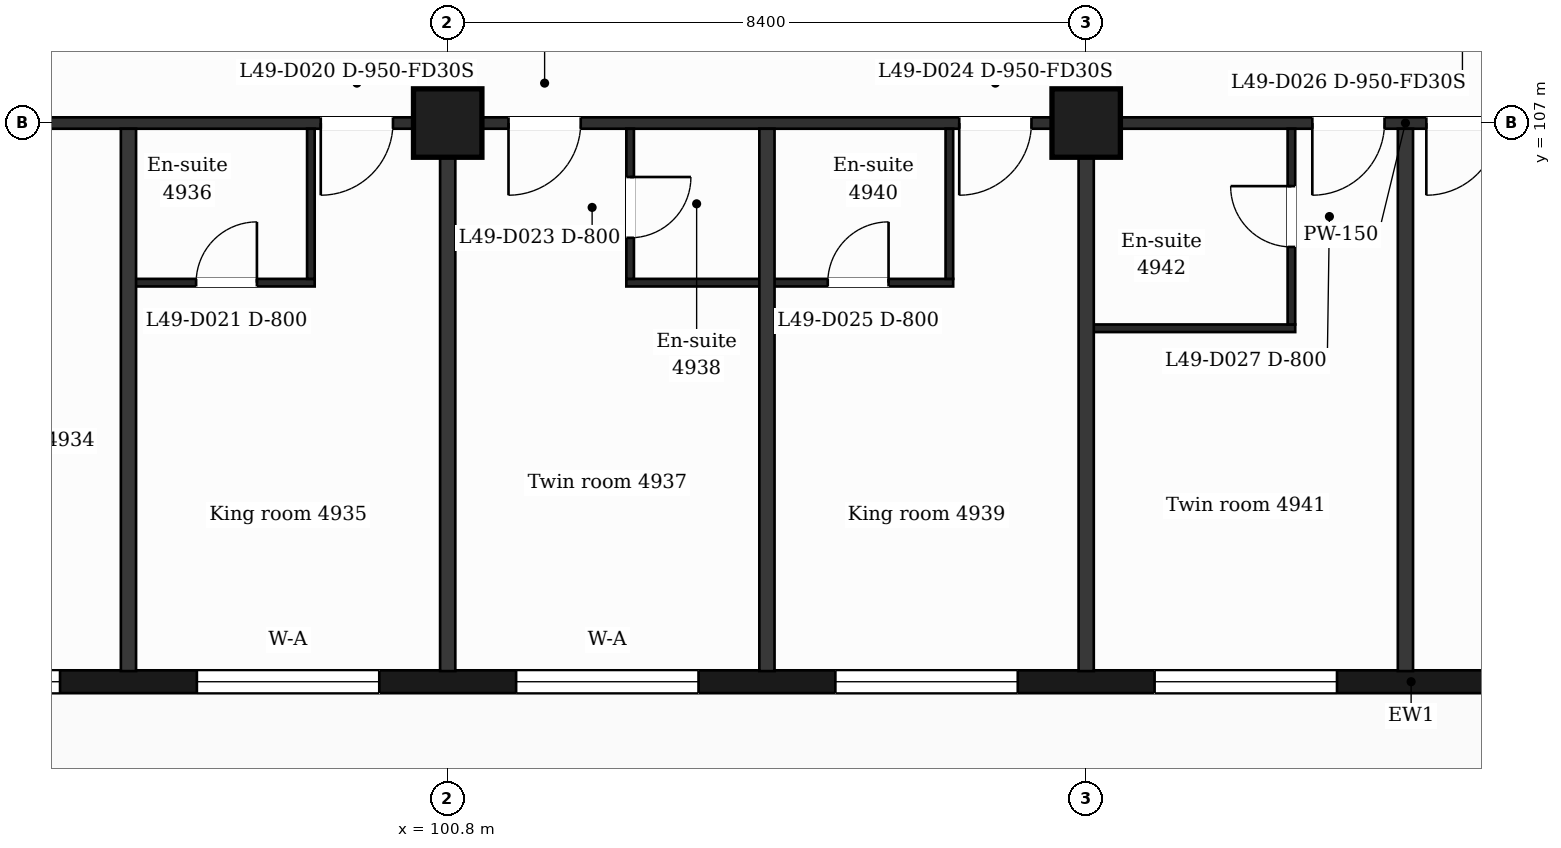
"""IFC4 building model, lengths in metres.
Left out: names, types, materials, properties, quantities, classifications, styles, units other than length and angle.
Written with IfcOpenShell. Run it as: python <this file> out.ifc"""

import sys

from ifc_helpers import new_model, si_unit, direction, frame, frame_2d, origin, origin_2d, place, context, subcontext, project, spatial, rectangle, extrude, element, fill, save


model = new_model("IFC4")
c1 = context("Model", 3, precision=1e-05, world=origin(), true_north=direction((0.0, 1.0)))
c2 = subcontext(c1, "Body", "Model", "MODEL_VIEW")
j1 = project(units=[si_unit("LENGTHUNIT", "METRE"), si_unit("PLANEANGLEUNIT", "RADIAN")], contexts=[c1])
p1 = place(None, origin())
s1 = spatial("IfcSite", under=j1, at=p1, CompositionType="ELEMENT")
p2 = place(p1, origin())
s2 = spatial("IfcBuilding", under=s1, at=p2, CompositionType="ELEMENT")
p3 = place(p2, frame((0.0, 0.0, 205.9)))
s3 = spatial("IfcBuildingStorey", under=s2, at=p3, CompositionType="ELEMENT", Elevation=205.9)
for number, where, z_axis, x_axis in (
    (1, (100.8, 107.0, 0.0), (0.0, 0.0, 1.0), (1.0, 0.0, 0.0)),
    (2, (109.2, 107.0, 0.0), (0.0, 0.0, 1.0), (1.0, 0.0, 0.0)),
):
    element("IfcColumn", number, at=place(p3, frame(where, z_axis=z_axis, x_axis=x_axis)), inside=s3, PredefinedType="COLUMN", context=c2, shape_type="SweptSolid", body=[
        extrude(rectangle(XDim=0.9, YDim=0.9, at=origin_2d()), origin(), (0.0, 0.0, 1.0), 3.7),
    ])
p4 = place(p3, frame((89.85, 99.65, 0.0), z_axis=(0.0, 0.0, 1.0), x_axis=(1.0, 0.0, 0.0)))
e3 = element("IfcWall", 3, at=p4, inside=s3, PredefinedType="SOLIDWALL", context=c2, shape_type="SweptSolid", body=[
    extrude(rectangle(XDim=47.25, YDim=0.3, at=frame_2d((23.625, 0.0))), origin(), (0.0, 0.0, 1.0), 3.38),
])
p5 = place(p4, frame((0.725, 0.0, 0.9)))
e4 = element("IfcOpeningElement", 4, at=p5, cuts=e3, PredefinedType="OPENING", context=c2, shape_type="SweptSolid", body=[
    extrude(rectangle(XDim=1.2, YDim=2.1, at=frame_2d((0.6, 1.05))), frame((0.0, 0.16, 0.0), z_axis=(0.0, -1.0, 0.0), x_axis=(1.0, 0.0, 0.0)), (0.0, 0.0, 1.0), 0.32),
])
p6 = place(p4, frame((3.45, 0.0, 0.9)))
e5 = element("IfcOpeningElement", 5, at=p6, cuts=e3, PredefinedType="OPENING", context=c2, shape_type="SweptSolid", body=[
    extrude(rectangle(XDim=2.4, YDim=2.1, at=frame_2d((1.2, 1.05))), frame((0.0, 0.16, 0.0), z_axis=(0.0, -1.0, 0.0), x_axis=(1.0, 0.0, 0.0)), (0.0, 0.0, 1.0), 0.32),
])
p7 = place(p4, frame((7.65, 0.0, 0.9)))
e6 = element("IfcOpeningElement", 6, at=p7, cuts=e3, PredefinedType="OPENING", context=c2, shape_type="SweptSolid", body=[
    extrude(rectangle(XDim=2.4, YDim=2.1, at=frame_2d((1.2, 1.05))), frame((0.0, 0.16, 0.0), z_axis=(0.0, -1.0, 0.0), x_axis=(1.0, 0.0, 0.0)), (0.0, 0.0, 1.0), 0.32),
])
p8 = place(p4, frame((11.85, 0.0, 0.9)))
e7 = element("IfcOpeningElement", 7, at=p8, cuts=e3, PredefinedType="OPENING", context=c2, shape_type="SweptSolid", body=[
    extrude(rectangle(XDim=2.4, YDim=2.1, at=frame_2d((1.2, 1.05))), frame((0.0, 0.16, 0.0), z_axis=(0.0, -1.0, 0.0), x_axis=(1.0, 0.0, 0.0)), (0.0, 0.0, 1.0), 0.32),
])
p9 = place(p4, frame((16.05, 0.0, 0.9)))
e8 = element("IfcOpeningElement", 8, at=p9, cuts=e3, PredefinedType="OPENING", context=c2, shape_type="SweptSolid", body=[
    extrude(rectangle(XDim=2.4, YDim=2.1, at=frame_2d((1.2, 1.05))), frame((0.0, 0.16, 0.0), z_axis=(0.0, -1.0, 0.0), x_axis=(1.0, 0.0, 0.0)), (0.0, 0.0, 1.0), 0.32),
])
p10 = place(p4, frame((20.25, 0.0, 0.9)))
e9 = element("IfcOpeningElement", 9, at=p10, cuts=e3, PredefinedType="OPENING", context=c2, shape_type="SweptSolid", body=[
    extrude(rectangle(XDim=2.4, YDim=2.1, at=frame_2d((1.2, 1.05))), frame((0.0, 0.16, 0.0), z_axis=(0.0, -1.0, 0.0), x_axis=(1.0, 0.0, 0.0)), (0.0, 0.0, 1.0), 0.32),
])
p11 = place(p4, frame((25.05, 0.0, 0.9)))
e10 = element("IfcOpeningElement", 10, at=p11, cuts=e3, PredefinedType="OPENING", context=c2, shape_type="SweptSolid", body=[
    extrude(rectangle(XDim=1.2, YDim=2.1, at=frame_2d((0.6, 1.05))), frame((0.0, 0.16, 0.0), z_axis=(0.0, -1.0, 0.0), x_axis=(1.0, 0.0, 0.0)), (0.0, 0.0, 1.0), 0.32),
])
p12 = place(p4, frame((29.25, 0.0, 0.9)))
e11 = element("IfcOpeningElement", 11, at=p12, cuts=e3, PredefinedType="OPENING", context=c2, shape_type="SweptSolid", body=[
    extrude(rectangle(XDim=1.2, YDim=2.1, at=frame_2d((0.6, 1.05))), frame((0.0, 0.16, 0.0), z_axis=(0.0, -1.0, 0.0), x_axis=(1.0, 0.0, 0.0)), (0.0, 0.0, 1.0), 0.32),
])
p13 = place(p4, frame((32.55, 0.0, 0.0)))
e12 = element("IfcOpeningElement", 12, at=p13, cuts=e3, PredefinedType="OPENING", context=c2, shape_type="SweptSolid", body=[
    extrude(rectangle(XDim=1.2, YDim=2.4, at=frame_2d((0.6, 1.2))), frame((0.0, 0.16, 0.0), z_axis=(0.0, -1.0, 0.0), x_axis=(1.0, 0.0, 0.0)), (0.0, 0.0, 1.0), 0.32),
])
p14 = place(p4, frame((34.35, 0.0, 0.9)))
e13 = element("IfcOpeningElement", 13, at=p14, cuts=e3, PredefinedType="OPENING", context=c2, shape_type="SweptSolid", body=[
    extrude(rectangle(XDim=1.2, YDim=2.1, at=frame_2d((0.6, 1.05))), frame((0.0, 0.16, 0.0), z_axis=(0.0, -1.0, 0.0), x_axis=(1.0, 0.0, 0.0)), (0.0, 0.0, 1.0), 0.32),
])
p15 = place(p4, frame((37.05, 0.0, 0.9)))
e14 = element("IfcOpeningElement", 14, at=p15, cuts=e3, PredefinedType="OPENING", context=c2, shape_type="SweptSolid", body=[
    extrude(rectangle(XDim=2.4, YDim=2.1, at=frame_2d((1.2, 1.05))), frame((0.0, 0.16, 0.0), z_axis=(0.0, -1.0, 0.0), x_axis=(1.0, 0.0, 0.0)), (0.0, 0.0, 1.0), 0.32),
])
p16 = place(p4, frame((40.95, 0.0, 0.0)))
e15 = element("IfcOpeningElement", 15, at=p16, cuts=e3, PredefinedType="OPENING", context=c2, shape_type="SweptSolid", body=[
    extrude(rectangle(XDim=1.2, YDim=2.4, at=frame_2d((0.6, 1.2))), frame((0.0, 0.16, 0.0), z_axis=(0.0, -1.0, 0.0), x_axis=(1.0, 0.0, 0.0)), (0.0, 0.0, 1.0), 0.32),
])
p17 = place(p4, frame((42.75, 0.0, 0.9)))
e16 = element("IfcOpeningElement", 16, at=p17, cuts=e3, PredefinedType="OPENING", context=c2, shape_type="SweptSolid", body=[
    extrude(rectangle(XDim=1.2, YDim=2.1, at=frame_2d((0.6, 1.05))), frame((0.0, 0.16, 0.0), z_axis=(0.0, -1.0, 0.0), x_axis=(1.0, 0.0, 0.0)), (0.0, 0.0, 1.0), 0.32),
])
p18 = place(p4, frame((45.25, 0.0, 0.9)))
e17 = element("IfcOpeningElement", 17, at=p18, cuts=e3, PredefinedType="OPENING", context=c2, shape_type="SweptSolid", body=[
    extrude(rectangle(XDim=1.2, YDim=2.1, at=frame_2d((0.6, 1.05))), frame((0.0, 0.16, 0.0), z_axis=(0.0, -1.0, 0.0), x_axis=(1.0, 0.0, 0.0)), (0.0, 0.0, 1.0), 0.32),
])
p19 = place(p3, frame((109.2, 104.3, 0.0), z_axis=(0.0, 0.0, 1.0), x_axis=(1.0, 0.0, 0.0)))
e18 = element("IfcWall", 18, at=p19, inside=s3, PredefinedType="PARTITIONING", context=c2, shape_type="SweptSolid", body=[
    extrude(rectangle(XDim=2.75, YDim=0.1, at=frame_2d((1.375, 0.0))), origin(), (0.0, 0.0, 1.0), 3.38),
])
p20 = place(p3, frame((96.6, 104.9, 0.0), z_axis=(0.0, 0.0, 1.0), x_axis=(1.0, 0.0, 0.0)))
e19 = element("IfcWall", 19, at=p20, inside=s3, PredefinedType="PARTITIONING", context=c2, shape_type="SweptSolid", body=[
    extrude(rectangle(XDim=2.45, YDim=0.1, at=frame_2d((1.225, 0.0))), origin(), (0.0, 0.0, 1.0), 3.38),
])
p21 = place(p20, frame((0.89, 0.0, 0.0)))
e20 = element("IfcOpeningElement", 20, at=p21, cuts=e19, PredefinedType="OPENING", context=c2, shape_type="SweptSolid", body=[
    extrude(rectangle(XDim=0.8, YDim=2.1, at=frame_2d((0.4, 1.05))), frame((0.0, 0.06, 0.0), z_axis=(0.0, -1.0, 0.0), x_axis=(1.0, 0.0, 0.0)), (0.0, 0.0, 1.0), 0.12),
])
p22 = place(p3, frame((103.15, 104.9, 0.0), z_axis=(0.0, 0.0, 1.0), x_axis=(1.0, 0.0, 0.0)))
e21 = element("IfcWall", 21, at=p22, inside=s3, PredefinedType="PARTITIONING", context=c2, shape_type="SweptSolid", body=[
    extrude(rectangle(XDim=4.3, YDim=0.1, at=frame_2d((2.15, 0.0))), origin(), (0.0, 0.0, 1.0), 3.38),
])
p23 = place(p22, frame((2.65, 0.0, 0.0)))
e22 = element("IfcOpeningElement", 22, at=p23, cuts=e21, PredefinedType="OPENING", context=c2, shape_type="SweptSolid", body=[
    extrude(rectangle(XDim=0.8, YDim=2.1, at=frame_2d((0.4, 1.05))), frame((0.0, 0.06, 0.0), z_axis=(0.0, -1.0, 0.0), x_axis=(1.0, 0.0, 0.0)), (0.0, 0.0, 1.0), 0.12),
])
p24 = place(p3, frame((87.018, 107.0, 0.0), z_axis=(0.0, 0.0, 1.0), x_axis=(1.0, 0.0, 0.0)))
e23 = element("IfcWall", 23, at=p24, inside=s3, PredefinedType="PARTITIONING", context=c2, shape_type="SweptSolid", body=[
    extrude(rectangle(XDim=52.765, YDim=0.15, at=frame_2d((26.382, 0.0))), origin(), (0.0, 0.0, 1.0), 3.38),
])
p25 = place(p24, frame((1.276, 0.0, 0.0)))
e24 = element("IfcOpeningElement", 24, at=p25, cuts=e23, PredefinedType="OPENING", context=c2, shape_type="SweptSolid", body=[
    extrude(rectangle(XDim=0.95, YDim=2.1, at=frame_2d((0.475, 1.05))), frame((0.0, 0.085, 0.0), z_axis=(0.0, -1.0, 0.0), x_axis=(1.0, 0.0, 0.0)), (0.0, 0.0, 1.0), 0.17),
])
p26 = place(p24, frame((6.369, 0.0, 0.0)))
e25 = element("IfcOpeningElement", 25, at=p26, cuts=e23, PredefinedType="OPENING", context=c2, shape_type="SweptSolid", body=[
    extrude(rectangle(XDim=0.95, YDim=2.1, at=frame_2d((0.475, 1.05))), frame((0.0, 0.085, 0.0), z_axis=(0.0, -1.0, 0.0), x_axis=(1.0, 0.0, 0.0)), (0.0, 0.0, 1.0), 0.17),
])
p27 = place(p24, frame((12.112, 0.0, 0.0)))
e26 = element("IfcOpeningElement", 26, at=p27, cuts=e23, PredefinedType="OPENING", context=c2, shape_type="SweptSolid", body=[
    extrude(rectangle(XDim=0.95, YDim=2.1, at=frame_2d((0.475, 1.05))), frame((0.0, 0.085, 0.0), z_axis=(0.0, -1.0, 0.0), x_axis=(1.0, 0.0, 0.0)), (0.0, 0.0, 1.0), 0.17),
])
p28 = place(p24, frame((14.582, 0.0, 0.0)))
e27 = element("IfcOpeningElement", 27, at=p28, cuts=e23, PredefinedType="OPENING", context=c2, shape_type="SweptSolid", body=[
    extrude(rectangle(XDim=0.95, YDim=2.1, at=frame_2d((0.475, 1.05))), frame((0.0, 0.085, 0.0), z_axis=(0.0, -1.0, 0.0), x_axis=(1.0, 0.0, 0.0)), (0.0, 0.0, 1.0), 0.17),
])
p29 = place(p24, frame((20.512, 0.0, 0.0)))
e28 = element("IfcOpeningElement", 28, at=p29, cuts=e23, PredefinedType="OPENING", context=c2, shape_type="SweptSolid", body=[
    extrude(rectangle(XDim=0.95, YDim=2.1, at=frame_2d((0.475, 1.05))), frame((0.0, 0.085, 0.0), z_axis=(0.0, -1.0, 0.0), x_axis=(1.0, 0.0, 0.0)), (0.0, 0.0, 1.0), 0.17),
])
p30 = place(p24, frame((25.157, 0.0, 0.0)))
e29 = element("IfcOpeningElement", 29, at=p30, cuts=e23, PredefinedType="OPENING", context=c2, shape_type="SweptSolid", body=[
    extrude(rectangle(XDim=0.95, YDim=2.1, at=frame_2d((0.475, 1.05))), frame((0.0, 0.085, 0.0), z_axis=(0.0, -1.0, 0.0), x_axis=(1.0, 0.0, 0.0)), (0.0, 0.0, 1.0), 0.17),
])
p31 = place(p24, frame((26.657, 0.0, 0.0)))
e30 = element("IfcOpeningElement", 30, at=p31, cuts=e23, PredefinedType="OPENING", context=c2, shape_type="SweptSolid", body=[
    extrude(rectangle(XDim=0.95, YDim=2.1, at=frame_2d((0.475, 1.05))), frame((0.0, 0.085, 0.0), z_axis=(0.0, -1.0, 0.0), x_axis=(1.0, 0.0, 0.0)), (0.0, 0.0, 1.0), 0.17),
])
p32 = place(p24, frame((31.302, 0.0, 0.0)))
e31 = element("IfcOpeningElement", 31, at=p32, cuts=e23, PredefinedType="OPENING", context=c2, shape_type="SweptSolid", body=[
    extrude(rectangle(XDim=0.95, YDim=2.1, at=frame_2d((0.475, 1.05))), frame((0.0, 0.085, 0.0), z_axis=(0.0, -1.0, 0.0), x_axis=(1.0, 0.0, 0.0)), (0.0, 0.0, 1.0), 0.17),
])
p33 = place(p24, frame((41.207, 0.0, 0.0)))
e32 = element("IfcOpeningElement", 32, at=p33, cuts=e23, PredefinedType="OPENING", context=c2, shape_type="SweptSolid", body=[
    extrude(rectangle(XDim=1.0, YDim=2.1, at=frame_2d((0.5, 1.05))), frame((0.0, 0.085, 0.0), z_axis=(0.0, -1.0, 0.0), x_axis=(1.0, 0.0, 0.0)), (0.0, 0.0, 1.0), 0.17),
])
p34 = place(p24, frame((43.907, 0.0, 0.0)))
e33 = element("IfcOpeningElement", 33, at=p34, cuts=e23, PredefinedType="OPENING", context=c2, shape_type="SweptSolid", body=[
    extrude(rectangle(XDim=0.95, YDim=2.1, at=frame_2d((0.475, 1.05))), frame((0.0, 0.085, 0.0), z_axis=(0.0, -1.0, 0.0), x_axis=(1.0, 0.0, 0.0)), (0.0, 0.0, 1.0), 0.17),
])
p35 = place(p24, frame((49.285, 0.0, 0.0)))
e34 = element("IfcOpeningElement", 34, at=p35, cuts=e23, PredefinedType="OPENING", context=c2, shape_type="SweptSolid", body=[
    extrude(rectangle(XDim=0.95, YDim=2.1, at=frame_2d((0.475, 1.05))), frame((0.0, 0.085, 0.0), z_axis=(0.0, -1.0, 0.0), x_axis=(1.0, 0.0, 0.0)), (0.0, 0.0, 1.0), 0.17),
])
p36 = place(p3, frame((96.6, 99.79, 0.0), z_axis=(0.0, 0.0, 1.0), x_axis=(0.0, 1.0, 0.0)))
e35 = element("IfcWall", 35, at=p36, inside=s3, PredefinedType="PARTITIONING", context=c2, shape_type="SweptSolid", body=[
    extrude(rectangle(XDim=7.135, YDim=0.2, at=frame_2d((3.567, 0.0))), origin(), (0.0, 0.0, 1.0), 3.38),
])
p37 = place(p3, frame((99.0, 104.95, 0.0), z_axis=(0.0, 0.0, 1.0), x_axis=(0.0, 1.0, 0.0)))
e36 = element("IfcWall", 36, at=p37, inside=s3, PredefinedType="PARTITIONING", context=c2, shape_type="SweptSolid", body=[
    extrude(rectangle(XDim=1.975, YDim=0.1, at=frame_2d((0.988, 0.0))), origin(), (0.0, 0.0, 1.0), 3.38),
])
p38 = place(p3, frame((100.8, 99.79, 0.0), z_axis=(0.0, 0.0, 1.0), x_axis=(0.0, 1.0, 0.0)))
e37 = element("IfcWall", 37, at=p38, inside=s3, PredefinedType="PARTITIONING", context=c2, shape_type="SweptSolid", body=[
    extrude(rectangle(XDim=7.135, YDim=0.2, at=frame_2d((3.567, 0.0))), origin(), (0.0, 0.0, 1.0), 3.38),
])
p39 = place(p3, frame((103.2, 104.95, 0.0), z_axis=(0.0, 0.0, 1.0), x_axis=(0.0, 1.0, 0.0)))
e38 = element("IfcWall", 38, at=p39, inside=s3, PredefinedType="PARTITIONING", context=c2, shape_type="SweptSolid", body=[
    extrude(rectangle(XDim=1.975, YDim=0.1, at=frame_2d((0.988, 0.0))), origin(), (0.0, 0.0, 1.0), 3.38),
])
p40 = place(p39, frame((0.54, 0.0, 0.0)))
e39 = element("IfcOpeningElement", 39, at=p40, cuts=e38, PredefinedType="OPENING", context=c2, shape_type="SweptSolid", body=[
    extrude(rectangle(XDim=0.8, YDim=2.1, at=frame_2d((0.4, 1.05))), frame((0.0, 0.06, 0.0), z_axis=(0.0, -1.0, 0.0), x_axis=(1.0, 0.0, 0.0)), (0.0, 0.0, 1.0), 0.12),
])
p41 = place(p3, frame((105.0, 99.79, 0.0), z_axis=(0.0, 0.0, 1.0), x_axis=(0.0, 1.0, 0.0)))
e40 = element("IfcWall", 40, at=p41, inside=s3, PredefinedType="PARTITIONING", context=c2, shape_type="SweptSolid", body=[
    extrude(rectangle(XDim=7.135, YDim=0.2, at=frame_2d((3.567, 0.0))), origin(), (0.0, 0.0, 1.0), 3.38),
])
p42 = place(p3, frame((107.4, 104.95, 0.0), z_axis=(0.0, 0.0, 1.0), x_axis=(0.0, 1.0, 0.0)))
e41 = element("IfcWall", 41, at=p42, inside=s3, PredefinedType="PARTITIONING", context=c2, shape_type="SweptSolid", body=[
    extrude(rectangle(XDim=1.975, YDim=0.1, at=frame_2d((0.988, 0.0))), origin(), (0.0, 0.0, 1.0), 3.38),
])
p43 = place(p3, frame((109.2, 99.79, 0.0), z_axis=(0.0, 0.0, 1.0), x_axis=(0.0, 1.0, 0.0)))
e42 = element("IfcWall", 42, at=p43, inside=s3, PredefinedType="PARTITIONING", context=c2, shape_type="SweptSolid", body=[
    extrude(rectangle(XDim=7.135, YDim=0.2, at=frame_2d((3.567, 0.0))), origin(), (0.0, 0.0, 1.0), 3.38),
])
p44 = place(p3, frame((111.9, 104.35, 0.0), z_axis=(0.0, 0.0, 1.0), x_axis=(0.0, 1.0, 0.0)))
e43 = element("IfcWall", 43, at=p44, inside=s3, PredefinedType="PARTITIONING", context=c2, shape_type="SweptSolid", body=[
    extrude(rectangle(XDim=2.575, YDim=0.1, at=frame_2d((1.288, 0.0))), origin(), (0.0, 0.0, 1.0), 3.38),
])
p45 = place(p44, frame((1.02, 0.0, 0.0)))
e44 = element("IfcOpeningElement", 44, at=p45, cuts=e43, PredefinedType="OPENING", context=c2, shape_type="SweptSolid", body=[
    extrude(rectangle(XDim=0.8, YDim=2.1, at=frame_2d((0.4, 1.05))), frame((0.0, 0.06, 0.0), z_axis=(0.0, -1.0, 0.0), x_axis=(1.0, 0.0, 0.0)), (0.0, 0.0, 1.0), 0.12),
])
p46 = place(p3, frame((113.4, 99.79, 0.0), z_axis=(0.0, 0.0, 1.0), x_axis=(0.0, 1.0, 0.0)))
e45 = element("IfcWall", 45, at=p46, inside=s3, PredefinedType="PARTITIONING", context=c2, shape_type="SweptSolid", body=[
    extrude(rectangle(XDim=7.135, YDim=0.2, at=frame_2d((3.567, 0.0))), origin(), (0.0, 0.0, 1.0), 3.38),
])
p47 = place(p6, origin())
e46 = element("IfcWindow", 46, at=p47, inside=s3, PartitioningType="SINGLE_PANEL", PredefinedType="WINDOW", context=c2, shape_type="SweptSolid", body=[
    extrude(rectangle(XDim=2.4, YDim=2.1, at=frame_2d((1.2, 1.05))), frame((0.0, 0.03, 0.0), z_axis=(0.0, -1.0, 0.0), x_axis=(1.0, 0.0, 0.0)), (0.0, 0.0, 1.0), 0.06),
])
fill(e5, e46)
p48 = place(p7, origin())
e47 = element("IfcWindow", 47, at=p48, inside=s3, PartitioningType="SINGLE_PANEL", PredefinedType="WINDOW", context=c2, shape_type="SweptSolid", body=[
    extrude(rectangle(XDim=2.4, YDim=2.1, at=frame_2d((1.2, 1.05))), frame((0.0, 0.03, 0.0), z_axis=(0.0, -1.0, 0.0), x_axis=(1.0, 0.0, 0.0)), (0.0, 0.0, 1.0), 0.06),
])
fill(e6, e47)
p49 = place(p8, origin())
e48 = element("IfcWindow", 48, at=p49, inside=s3, PartitioningType="SINGLE_PANEL", PredefinedType="WINDOW", context=c2, shape_type="SweptSolid", body=[
    extrude(rectangle(XDim=2.4, YDim=2.1, at=frame_2d((1.2, 1.05))), frame((0.0, 0.03, 0.0), z_axis=(0.0, -1.0, 0.0), x_axis=(1.0, 0.0, 0.0)), (0.0, 0.0, 1.0), 0.06),
])
fill(e7, e48)
p50 = place(p9, origin())
e49 = element("IfcWindow", 49, at=p50, inside=s3, PartitioningType="SINGLE_PANEL", PredefinedType="WINDOW", context=c2, shape_type="SweptSolid", body=[
    extrude(rectangle(XDim=2.4, YDim=2.1, at=frame_2d((1.2, 1.05))), frame((0.0, 0.03, 0.0), z_axis=(0.0, -1.0, 0.0), x_axis=(1.0, 0.0, 0.0)), (0.0, 0.0, 1.0), 0.06),
])
fill(e8, e49)
p51 = place(p10, origin())
e50 = element("IfcWindow", 50, at=p51, inside=s3, PartitioningType="SINGLE_PANEL", PredefinedType="WINDOW", context=c2, shape_type="SweptSolid", body=[
    extrude(rectangle(XDim=2.4, YDim=2.1, at=frame_2d((1.2, 1.05))), frame((0.0, 0.03, 0.0), z_axis=(0.0, -1.0, 0.0), x_axis=(1.0, 0.0, 0.0)), (0.0, 0.0, 1.0), 0.06),
])
fill(e9, e50)
p52 = place(p27, origin())
e51 = element("IfcDoor", 51, at=p52, inside=s3, OperationType="SINGLE_SWING_LEFT", PredefinedType="DOOR", context=c2, shape_type="SweptSolid", body=[
    extrude(rectangle(XDim=0.95, YDim=2.1, at=frame_2d((0.475, 1.05))), frame((0.0, 0.025, 0.0), z_axis=(0.0, -1.0, 0.0), x_axis=(1.0, 0.0, 0.0)), (0.0, 0.0, 1.0), 0.05),
])
fill(e26, e51)
p53 = place(p21, origin())
e52 = element("IfcDoor", 52, at=p53, inside=s3, OperationType="SINGLE_SWING_RIGHT", PredefinedType="DOOR", context=c2, shape_type="SweptSolid", body=[
    extrude(rectangle(XDim=0.8, YDim=2.1, at=frame_2d((0.4, 1.05))), frame((0.0, 0.025, 0.0), z_axis=(0.0, -1.0, 0.0), x_axis=(1.0, 0.0, 0.0)), (0.0, 0.0, 1.0), 0.05),
])
fill(e20, e52)
p54 = place(p28, origin())
e53 = element("IfcDoor", 53, at=p54, inside=s3, OperationType="SINGLE_SWING_LEFT", PredefinedType="DOOR", context=c2, shape_type="SweptSolid", body=[
    extrude(rectangle(XDim=0.95, YDim=2.1, at=frame_2d((0.475, 1.05))), frame((0.0, 0.025, 0.0), z_axis=(0.0, -1.0, 0.0), x_axis=(1.0, 0.0, 0.0)), (0.0, 0.0, 1.0), 0.05),
])
fill(e27, e53)
p55 = place(p40, origin())
e54 = element("IfcDoor", 54, at=p55, inside=s3, OperationType="SINGLE_SWING_RIGHT", PredefinedType="DOOR", context=c2, shape_type="SweptSolid", body=[
    extrude(rectangle(XDim=0.8, YDim=2.1, at=frame_2d((0.4, 1.05))), frame((0.0, 0.025, 0.0), z_axis=(0.0, -1.0, 0.0), x_axis=(1.0, 0.0, 0.0)), (0.0, 0.0, 1.0), 0.05),
])
fill(e39, e54)
p56 = place(p29, origin())
e55 = element("IfcDoor", 55, at=p56, inside=s3, OperationType="SINGLE_SWING_LEFT", PredefinedType="DOOR", context=c2, shape_type="SweptSolid", body=[
    extrude(rectangle(XDim=0.95, YDim=2.1, at=frame_2d((0.475, 1.05))), frame((0.0, 0.025, 0.0), z_axis=(0.0, -1.0, 0.0), x_axis=(1.0, 0.0, 0.0)), (0.0, 0.0, 1.0), 0.05),
])
fill(e28, e55)
p57 = place(p23, origin())
e56 = element("IfcDoor", 56, at=p57, inside=s3, OperationType="SINGLE_SWING_RIGHT", PredefinedType="DOOR", context=c2, shape_type="SweptSolid", body=[
    extrude(rectangle(XDim=0.8, YDim=2.1, at=frame_2d((0.4, 1.05))), frame((0.0, 0.025, 0.0), z_axis=(0.0, -1.0, 0.0), x_axis=(1.0, 0.0, 0.0)), (0.0, 0.0, 1.0), 0.05),
])
fill(e22, e56)
p58 = place(p30, origin())
e57 = element("IfcDoor", 57, at=p58, inside=s3, OperationType="SINGLE_SWING_LEFT", PredefinedType="DOOR", context=c2, shape_type="SweptSolid", body=[
    extrude(rectangle(XDim=0.95, YDim=2.1, at=frame_2d((0.475, 1.05))), frame((0.0, 0.025, 0.0), z_axis=(0.0, -1.0, 0.0), x_axis=(1.0, 0.0, 0.0)), (0.0, 0.0, 1.0), 0.05),
])
fill(e29, e57)
p59 = place(p45, origin())
e58 = element("IfcDoor", 58, at=p59, inside=s3, OperationType="SINGLE_SWING_RIGHT", PredefinedType="DOOR", context=c2, shape_type="SweptSolid", body=[
    extrude(rectangle(XDim=0.8, YDim=2.1, at=frame_2d((0.4, 1.05))), frame((0.0, 0.025, 0.0), z_axis=(0.0, -1.0, 0.0), x_axis=(1.0, 0.0, 0.0)), (0.0, 0.0, 1.0), 0.05),
])
fill(e44, e58)
p60 = place(p31, origin())
e59 = element("IfcDoor", 59, at=p60, inside=s3, OperationType="SINGLE_SWING_LEFT", PredefinedType="DOOR", context=c2, shape_type="SweptSolid", body=[
    extrude(rectangle(XDim=0.95, YDim=2.1, at=frame_2d((0.475, 1.05))), frame((0.0, 0.025, 0.0), z_axis=(0.0, -1.0, 0.0), x_axis=(1.0, 0.0, 0.0)), (0.0, 0.0, 1.0), 0.05),
])
fill(e30, e59)
save(model, sys.argv[1])
